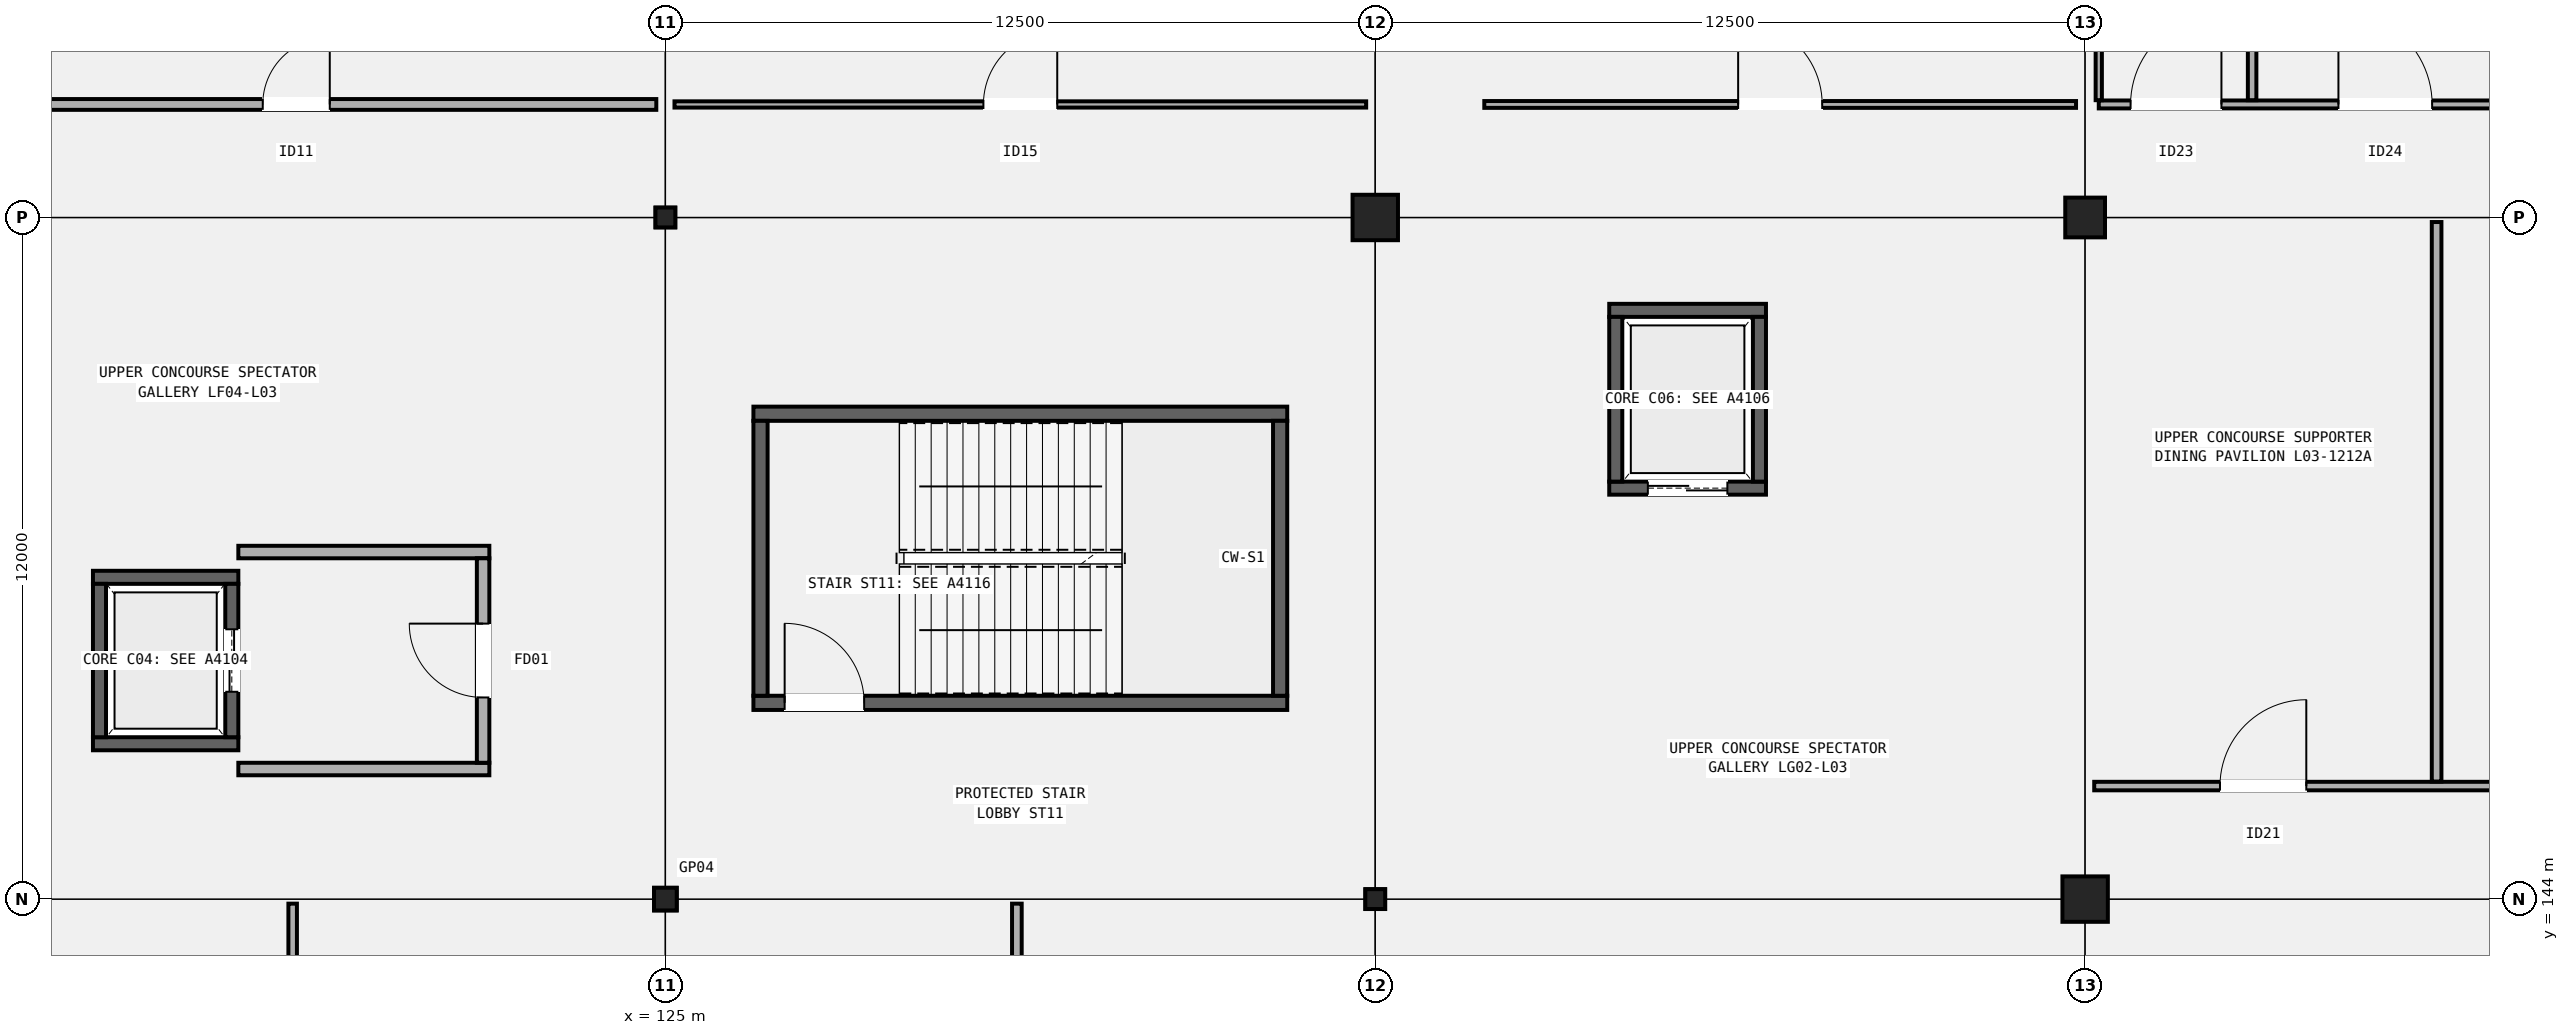
"""IFC4 building model, lengths in metres.
Left out: names, types, materials, properties, quantities, classifications, styles, units other than length and angle.
Written with IfcOpenShell. Run it as: python <this file> out.ifc"""

import sys

from ifc_helpers import new_model, si_unit, direction, frame, frame_2d, origin, origin_2d, place, context, subcontext, project, spatial, rectangle, hollow_rectangle, extrude, element, fill, save


model = new_model("IFC4")
c1 = context("Model", 3, precision=1e-05, world=origin(), true_north=direction((0.0, 1.0)))
c2 = subcontext(c1, "Body", "Model", "MODEL_VIEW")
j1 = project(units=[si_unit("LENGTHUNIT", "METRE"), si_unit("PLANEANGLEUNIT", "RADIAN")], contexts=[c1])
p1 = place(None, origin())
s1 = spatial("IfcSite", under=j1, at=p1, CompositionType="ELEMENT")
p2 = place(p1, origin())
s2 = spatial("IfcBuilding", under=s1, at=p2, CompositionType="ELEMENT")
p3 = place(p2, frame((0.0, 0.0, 15.3)))
s3 = spatial("IfcBuildingStorey", under=s2, at=p3, CompositionType="ELEMENT", Elevation=15.3)
p4 = place(p3, frame((125.0, 144.0, 0.0), z_axis=(0.0, 0.0, 1.0), x_axis=(1.0, 0.0, 0.0)))
e1 = element("IfcColumn", 1, at=p4, inside=s3, PredefinedType="COLUMN", context=c2, shape_type="SweptSolid", body=[
    extrude(hollow_rectangle(XDim=0.4, YDim=0.4, WallThickness=0.016, InnerFilletRadius=0.016, OuterFilletRadius=0.032, at=origin_2d()), origin(), (0.0, 0.0, 1.0), 5.1),
])
for number, where, z_axis, x_axis in (
    (2, (125.0, 156.0, 0.0), (0.0, 0.0, 1.0), (1.0, 0.0, 0.0)),
    (3, (137.5, 144.0, 0.0), (0.0, 0.0, 1.0), (1.0, 0.0, 0.0)),
):
    element("IfcColumn", number, at=place(p3, frame(where, z_axis=z_axis, x_axis=x_axis)), inside=s3, PredefinedType="COLUMN", context=c2, shape_type="SweptSolid", body=[
        extrude(hollow_rectangle(XDim=0.35, YDim=0.35, WallThickness=0.016, InnerFilletRadius=0.016, OuterFilletRadius=0.032, at=origin_2d()), origin(), (0.0, 0.0, 1.0), 5.1),
    ])
for number, where, z_axis, x_axis in (
    (4, (137.5, 156.0, 0.0), (0.0, 0.0, 1.0), (1.0, 0.0, 0.0)),
    (5, (150.0, 144.0, 0.0), (0.0, 0.0, 1.0), (1.0, 0.0, 0.0)),
):
    element("IfcColumn", number, at=place(p3, frame(where, z_axis=z_axis, x_axis=x_axis)), inside=s3, PredefinedType="COLUMN", context=c2, shape_type="SweptSolid", body=[
        extrude(rectangle(XDim=0.8, YDim=0.8, at=origin_2d()), origin(), (0.0, 0.0, 1.0), 5.1),
    ])
p5 = place(p3, frame((150.0, 156.0, 0.0), z_axis=(0.0, 0.0, 1.0), x_axis=(1.0, 0.0, 0.0)))
e6 = element("IfcColumn", 6, at=p5, inside=s3, PredefinedType="COLUMN", context=c2, shape_type="SweptSolid", body=[
    extrude(rectangle(XDim=0.7, YDim=0.7, at=origin_2d()), origin(), (0.0, 0.0, 1.0), 5.1),
])
p6 = place(p3, frame((126.55, 147.455, 0.0), z_axis=(0.0, 0.0, 1.0), x_axis=(1.0, 0.0, 0.0)))
e7 = element("IfcWall", 7, at=p6, inside=s3, PredefinedType="SHEAR", context=c2, shape_type="SweptSolid", body=[
    extrude(rectangle(XDim=9.4, YDim=0.25, at=frame_2d((4.7, 0.0))), origin(), (0.0, 0.0, 1.0), 4.86),
])
p7 = place(p6, frame((0.55, 0.0, 0.0)))
e8 = element("IfcOpeningElement", 8, at=p7, cuts=e7, PredefinedType="OPENING", context=c2, shape_type="SweptSolid", body=[
    extrude(rectangle(XDim=1.4, YDim=2.15, at=frame_2d((0.7, 1.075))), frame((0.0, 0.135, 0.0), z_axis=(0.0, -1.0, 0.0), x_axis=(1.0, 0.0, 0.0)), (0.0, 0.0, 1.0), 0.27),
])
p8 = place(p3, frame((126.55, 152.545, 0.0), z_axis=(0.0, 0.0, 1.0), x_axis=(1.0, 0.0, 0.0)))
e9 = element("IfcWall", 9, at=p8, inside=s3, PredefinedType="SHEAR", context=c2, shape_type="SweptSolid", body=[
    extrude(rectangle(XDim=9.4, YDim=0.25, at=frame_2d((4.7, 0.0))), origin(), (0.0, 0.0, 1.0), 4.86),
])
for number, where, z_axis, x_axis in (
    (10, (126.675, 147.58, 0.0), (0.0, 0.0, 1.0), (0.0, 1.0, 0.0)),
    (11, (135.825, 147.58, 0.0), (0.0, 0.0, 1.0), (0.0, 1.0, 0.0)),
):
    element("IfcWall", number, at=place(p3, frame(where, z_axis=z_axis, x_axis=x_axis)), inside=s3, PredefinedType="SHEAR", context=c2, shape_type="SweptSolid", body=[
        extrude(rectangle(XDim=4.84, YDim=0.25, at=frame_2d((2.42, 0.0))), origin(), (0.0, 0.0, 1.0), 4.86),
    ])
for number, where, z_axis, x_axis in (
    (12, (114.92, 146.735, 0.0), (0.0, 0.0, 1.0), (1.0, 0.0, 0.0)),
    (13, (114.92, 149.665, 0.0), (0.0, 0.0, 1.0), (1.0, 0.0, 0.0)),
):
    element("IfcWall", number, at=place(p3, frame(where, z_axis=z_axis, x_axis=x_axis)), inside=s3, PredefinedType="SHEAR", context=c2, shape_type="SweptSolid", body=[
        extrude(rectangle(XDim=2.56, YDim=0.23, at=frame_2d((1.28, 0.0))), origin(), (0.0, 0.0, 1.0), 4.86),
    ])
p9 = place(p3, frame((115.035, 146.85, 0.0), z_axis=(0.0, 0.0, 1.0), x_axis=(0.0, 1.0, 0.0)))
e14 = element("IfcWall", 14, at=p9, inside=s3, PredefinedType="SHEAR", context=c2, shape_type="SweptSolid", body=[
    extrude(rectangle(XDim=2.7, YDim=0.23, at=frame_2d((1.35, 0.0))), origin(), (0.0, 0.0, 1.0), 4.86),
])
p10 = place(p3, frame((117.365, 146.85, 0.0), z_axis=(0.0, 0.0, 1.0), x_axis=(0.0, 1.0, 0.0)))
e15 = element("IfcWall", 15, at=p10, inside=s3, PredefinedType="SHEAR", context=c2, shape_type="SweptSolid", body=[
    extrude(rectangle(XDim=2.7, YDim=0.23, at=frame_2d((1.35, 0.0))), origin(), (0.0, 0.0, 1.0), 4.86),
])
p11 = place(p10, frame((0.8, 0.0, 0.0)))
e16 = element("IfcOpeningElement", 16, at=p11, cuts=e15, PredefinedType="OPENING", context=c2, shape_type="SweptSolid", body=[
    extrude(rectangle(XDim=1.1, YDim=2.15, at=frame_2d((0.55, 1.075))), frame((0.0, 0.125, 0.0), z_axis=(0.0, -1.0, 0.0), x_axis=(1.0, 0.0, 0.0)), (0.0, 0.0, 1.0), 0.25),
])
for number, where, z_axis, x_axis in (
    (17, (117.48, 146.29, 0.0), (0.0, 0.0, 1.0), (1.0, 0.0, 0.0)),
    (18, (117.48, 150.11, 0.0), (0.0, 0.0, 1.0), (1.0, 0.0, 0.0)),
):
    element("IfcWall", number, at=place(p3, frame(where, z_axis=z_axis, x_axis=x_axis)), inside=s3, PredefinedType="SOLIDWALL", context=c2, shape_type="SweptSolid", body=[
        extrude(rectangle(XDim=4.42, YDim=0.22, at=frame_2d((2.21, 0.0))), origin(), (0.0, 0.0, 1.0), 4.22),
    ])
p12 = place(p3, frame((121.79, 146.4, 0.0), z_axis=(0.0, 0.0, 1.0), x_axis=(0.0, 1.0, 0.0)))
e19 = element("IfcWall", 19, at=p12, inside=s3, PredefinedType="SOLIDWALL", context=c2, shape_type="SweptSolid", body=[
    extrude(rectangle(XDim=3.6, YDim=0.22, at=frame_2d((1.8, 0.0))), origin(), (0.0, 0.0, 1.0), 4.22),
])
p13 = place(p12, frame((1.15, 0.0, 0.0)))
e20 = element("IfcOpeningElement", 20, at=p13, cuts=e19, PredefinedType="OPENING", context=c2, shape_type="SweptSolid", body=[
    extrude(rectangle(XDim=1.3, YDim=2.15, at=frame_2d((0.65, 1.075))), frame((0.0, 0.12, 0.0), z_axis=(0.0, -1.0, 0.0), x_axis=(1.0, 0.0, 0.0)), (0.0, 0.0, 1.0), 0.24),
])
p14 = place(p3, frame((141.62, 151.235, 0.0), z_axis=(0.0, 0.0, 1.0), x_axis=(1.0, 0.0, 0.0)))
e21 = element("IfcWall", 21, at=p14, inside=s3, PredefinedType="SHEAR", context=c2, shape_type="SweptSolid", body=[
    extrude(rectangle(XDim=2.76, YDim=0.23, at=frame_2d((1.38, 0.0))), origin(), (0.0, 0.0, 1.0), 4.86),
])
p15 = place(p14, frame((0.68, 0.0, 0.0)))
e22 = element("IfcOpeningElement", 22, at=p15, cuts=e21, PredefinedType="OPENING", context=c2, shape_type="SweptSolid", body=[
    extrude(rectangle(XDim=1.4, YDim=2.25, at=frame_2d((0.7, 1.125))), frame((0.0, 0.125, 0.0), z_axis=(0.0, -1.0, 0.0), x_axis=(1.0, 0.0, 0.0)), (0.0, 0.0, 1.0), 0.25),
])
p16 = place(p3, frame((141.62, 154.365, 0.0), z_axis=(0.0, 0.0, 1.0), x_axis=(1.0, 0.0, 0.0)))
e23 = element("IfcWall", 23, at=p16, inside=s3, PredefinedType="SHEAR", context=c2, shape_type="SweptSolid", body=[
    extrude(rectangle(XDim=2.76, YDim=0.23, at=frame_2d((1.38, 0.0))), origin(), (0.0, 0.0, 1.0), 4.86),
])
for number, where, z_axis, x_axis in (
    (24, (141.735, 151.35, 0.0), (0.0, 0.0, 1.0), (0.0, 1.0, 0.0)),
    (25, (144.265, 151.35, 0.0), (0.0, 0.0, 1.0), (0.0, 1.0, 0.0)),
):
    element("IfcWall", number, at=place(p3, frame(where, z_axis=z_axis, x_axis=x_axis)), inside=s3, PredefinedType="SHEAR", context=c2, shape_type="SweptSolid", body=[
        extrude(rectangle(XDim=2.9, YDim=0.23, at=frame_2d((1.45, 0.0))), origin(), (0.0, 0.0, 1.0), 4.86),
    ])
p17 = place(p3, frame((118.437, 134.065, 0.0), z_axis=(0.0, 0.0, 1.0), x_axis=(0.0, 1.0, 0.0)))
e26 = element("IfcWall", 26, at=p17, inside=s3, PredefinedType="PARTITIONING", context=c2, shape_type="SweptSolid", body=[
    extrude(rectangle(XDim=9.855, YDim=0.15, at=frame_2d((4.927, 0.0))), origin(), (0.0, 0.0, 1.0), 2.77),
])
p18 = place(p3, frame((112.16, 157.99, 0.0), z_axis=(0.0, 0.0, 1.0), x_axis=(1.0, 0.0, 0.0)))
e27 = element("IfcWall", 27, at=p18, inside=s3, PredefinedType="PARTITIONING", context=c2, shape_type="SweptSolid", body=[
    extrude(rectangle(XDim=12.68, YDim=0.19, at=frame_2d((6.34, 0.0))), origin(), (0.0, 0.0, 1.0), 4.22),
])
p19 = place(p18, frame((5.75, 0.0, 0.0)))
e28 = element("IfcOpeningElement", 28, at=p19, cuts=e27, PredefinedType="OPENING", context=c2, shape_type="SweptSolid", body=[
    extrude(rectangle(XDim=1.18, YDim=2.2, at=frame_2d((0.59, 1.1))), frame((0.0, 0.105, 0.0), z_axis=(0.0, -1.0, 0.0), x_axis=(1.0, 0.0, 0.0)), (0.0, 0.0, 1.0), 0.21),
])
p20 = place(p3, frame((131.189, 134.07, 0.0), z_axis=(0.0, 0.0, 1.0), x_axis=(0.0, 1.0, 0.0)))
e29 = element("IfcWall", 29, at=p20, inside=s3, PredefinedType="PARTITIONING", context=c2, shape_type="SweptSolid", body=[
    extrude(rectangle(XDim=9.85, YDim=0.17, at=frame_2d((4.925, 0.0))), origin(), (0.0, 0.0, 1.0), 2.77),
])
p21 = place(p3, frame((125.16, 157.99, 0.0), z_axis=(0.0, 0.0, 1.0), x_axis=(1.0, 0.0, 0.0)))
e30 = element("IfcWall", 30, at=p21, inside=s3, PredefinedType="PARTITIONING", context=c2, shape_type="SweptSolid", body=[
    extrude(rectangle(XDim=12.18, YDim=0.11, at=frame_2d((6.09, 0.0))), origin(), (0.0, 0.0, 1.0), 4.22),
])
p22 = place(p21, frame((5.44, 0.0, 0.0)))
e31 = element("IfcOpeningElement", 31, at=p22, cuts=e30, PredefinedType="OPENING", context=c2, shape_type="SweptSolid", body=[
    extrude(rectangle(XDim=1.3, YDim=2.24, at=frame_2d((0.65, 1.12))), frame((0.0, 0.065, 0.0), z_axis=(0.0, -1.0, 0.0), x_axis=(1.0, 0.0, 0.0)), (0.0, 0.0, 1.0), 0.13),
])
p23 = place(p3, frame((139.42, 157.99, 0.0), z_axis=(0.0, 0.0, 1.0), x_axis=(1.0, 0.0, 0.0)))
e32 = element("IfcWall", 32, at=p23, inside=s3, PredefinedType="PARTITIONING", context=c2, shape_type="SweptSolid", body=[
    extrude(rectangle(XDim=10.42, YDim=0.12, at=frame_2d((5.21, 0.0))), origin(), (0.0, 0.0, 1.0), 4.22),
])
p24 = place(p23, frame((4.47, 0.0, 0.0)))
e33 = element("IfcOpeningElement", 33, at=p24, cuts=e32, PredefinedType="OPENING", context=c2, shape_type="SweptSolid", body=[
    extrude(rectangle(XDim=1.48, YDim=2.24, at=frame_2d((0.74, 1.12))), frame((0.0, 0.07, 0.0), z_axis=(0.0, -1.0, 0.0), x_axis=(1.0, 0.0, 0.0)), (0.0, 0.0, 1.0), 0.14),
])
p25 = place(p3, frame((150.16, 145.99, 0.0), z_axis=(0.0, 0.0, 1.0), x_axis=(1.0, 0.0, 0.0)))
e34 = element("IfcWall", 34, at=p25, inside=s3, PredefinedType="PARTITIONING", context=c2, shape_type="SweptSolid", body=[
    extrude(rectangle(XDim=12.18, YDim=0.15, at=frame_2d((6.09, 0.0))), origin(), (0.0, 0.0, 1.0), 4.22),
])
p26 = place(p25, frame((2.215, 0.0, 0.0)))
e35 = element("IfcOpeningElement", 35, at=p26, cuts=e34, PredefinedType="OPENING", context=c2, shape_type="SweptSolid", body=[
    extrude(rectangle(XDim=1.52, YDim=2.28, at=frame_2d((0.76, 1.14))), frame((0.0, 0.085, 0.0), z_axis=(0.0, -1.0, 0.0), x_axis=(1.0, 0.0, 0.0)), (0.0, 0.0, 1.0), 0.17),
])
p27 = place(p25, frame((8.365, 0.0, 0.0)))
e36 = element("IfcOpeningElement", 36, at=p27, cuts=e34, PredefinedType="OPENING", context=c2, shape_type="SweptSolid", body=[
    extrude(rectangle(XDim=1.56, YDim=2.26, at=frame_2d((0.78, 1.13))), frame((0.0, 0.085, 0.0), z_axis=(0.0, -1.0, 0.0), x_axis=(1.0, 0.0, 0.0)), (0.0, 0.0, 1.0), 0.17),
])
p28 = place(p3, frame((156.189, 146.07, 0.0), z_axis=(0.0, 0.0, 1.0), x_axis=(0.0, 1.0, 0.0)))
e37 = element("IfcWall", 37, at=p28, inside=s3, PredefinedType="PARTITIONING", context=c2, shape_type="SweptSolid", body=[
    extrude(rectangle(XDim=9.85, YDim=0.17, at=frame_2d((4.925, 0.0))), origin(), (0.0, 0.0, 1.0), 4.22),
])
p29 = place(p3, frame((150.24, 157.99, 0.0), z_axis=(0.0, 0.0, 1.0), x_axis=(1.0, 0.0, 0.0)))
e38 = element("IfcWall", 38, at=p29, inside=s3, PredefinedType="PARTITIONING", context=c2, shape_type="SweptSolid", body=[
    extrude(rectangle(XDim=12.02, YDim=0.14, at=frame_2d((6.01, 0.0))), origin(), (0.0, 0.0, 1.0), 4.22),
])
p30 = place(p29, frame((0.56, 0.0, 0.0)))
e39 = element("IfcOpeningElement", 39, at=p30, cuts=e38, PredefinedType="OPENING", context=c2, shape_type="SweptSolid", body=[
    extrude(rectangle(XDim=1.6, YDim=2.3, at=frame_2d((0.8, 1.15))), frame((0.0, 0.08, 0.0), z_axis=(0.0, -1.0, 0.0), x_axis=(1.0, 0.0, 0.0)), (0.0, 0.0, 1.0), 0.16),
])
p31 = place(p29, frame((4.22, 0.0, 0.0)))
e40 = element("IfcOpeningElement", 40, at=p31, cuts=e38, PredefinedType="OPENING", context=c2, shape_type="SweptSolid", body=[
    extrude(rectangle(XDim=1.65, YDim=2.28, at=frame_2d((0.825, 1.14))), frame((0.0, 0.08, 0.0), z_axis=(0.0, -1.0, 0.0), x_axis=(1.0, 0.0, 0.0)), (0.0, 0.0, 1.0), 0.16),
])
p32 = place(p29, frame((8.845, 0.0, 0.0)))
e41 = element("IfcOpeningElement", 41, at=p32, cuts=e38, PredefinedType="OPENING", context=c2, shape_type="SweptSolid", body=[
    extrude(rectangle(XDim=1.7, YDim=2.32, at=frame_2d((0.85, 1.16))), frame((0.0, 0.08, 0.0), z_axis=(0.0, -1.0, 0.0), x_axis=(1.0, 0.0, 0.0)), (0.0, 0.0, 1.0), 0.16),
])
p33 = place(p3, frame((150.24, 158.065, 0.0), z_axis=(0.0, 0.0, 1.0), x_axis=(0.0, 1.0, 0.0)))
e42 = element("IfcWall", 42, at=p33, inside=s3, PredefinedType="PARTITIONING", context=c2, shape_type="SweptSolid", body=[
    extrude(rectangle(XDim=9.731, YDim=0.11, at=frame_2d((4.865, 0.0))), origin(), (0.0, 0.0, 1.0), 4.22),
])
p34 = place(p3, frame((152.94, 158.065, 0.0), z_axis=(0.0, 0.0, 1.0), x_axis=(0.0, 1.0, 0.0)))
e43 = element("IfcWall", 43, at=p34, inside=s3, PredefinedType="PARTITIONING", context=c2, shape_type="SweptSolid", body=[
    extrude(rectangle(XDim=9.911, YDim=0.15, at=frame_2d((4.956, 0.0))), origin(), (0.0, 0.0, 1.0), 4.22),
])
p35 = place(p7, origin())
e44 = element("IfcDoor", 44, at=p35, inside=s3, OperationType="SINGLE_SWING_LEFT", PredefinedType="DOOR", context=c2, shape_type="SweptSolid", body=[
    extrude(rectangle(XDim=1.4, YDim=2.15, at=frame_2d((0.7, 1.075))), frame((0.0, 0.025, 0.0), z_axis=(0.0, -1.0, 0.0), x_axis=(1.0, 0.0, 0.0)), (0.0, 0.0, 1.0), 0.05),
])
fill(e8, e44)
p36 = place(p11, origin())
e45 = element("IfcDoor", 45, at=p36, inside=s3, OperationType="DOUBLE_DOOR_SLIDING", PredefinedType="DOOR", context=c2, shape_type="SweptSolid", body=[
    extrude(rectangle(XDim=1.1, YDim=2.15, at=frame_2d((0.55, 1.075))), frame((0.0, 0.025, 0.0), z_axis=(0.0, -1.0, 0.0), x_axis=(1.0, 0.0, 0.0)), (0.0, 0.0, 1.0), 0.05),
])
fill(e16, e45)
p37 = place(p13, origin())
e46 = element("IfcDoor", 46, at=p37, inside=s3, OperationType="SINGLE_SWING_RIGHT", PredefinedType="DOOR", context=c2, shape_type="SweptSolid", body=[
    extrude(rectangle(XDim=1.3, YDim=2.15, at=frame_2d((0.65, 1.075))), frame((0.0, 0.025, 0.0), z_axis=(0.0, -1.0, 0.0), x_axis=(1.0, 0.0, 0.0)), (0.0, 0.0, 1.0), 0.05),
])
fill(e20, e46)
p38 = place(p15, origin())
e47 = element("IfcDoor", 47, at=p38, inside=s3, OperationType="DOUBLE_DOOR_SLIDING", PredefinedType="DOOR", context=c2, shape_type="SweptSolid", body=[
    extrude(rectangle(XDim=1.4, YDim=2.25, at=frame_2d((0.7, 1.125))), frame((0.0, 0.025, 0.0), z_axis=(0.0, -1.0, 0.0), x_axis=(1.0, 0.0, 0.0)), (0.0, 0.0, 1.0), 0.05),
])
fill(e22, e47)
p39 = place(p19, origin())
e48 = element("IfcDoor", 48, at=p39, inside=s3, OperationType="SINGLE_SWING_RIGHT", PredefinedType="DOOR", context=c2, shape_type="SweptSolid", body=[
    extrude(rectangle(XDim=1.18, YDim=2.2, at=frame_2d((0.59, 1.1))), frame((0.0, 0.025, 0.0), z_axis=(0.0, -1.0, 0.0), x_axis=(1.0, 0.0, 0.0)), (0.0, 0.0, 1.0), 0.05),
])
fill(e28, e48)
p40 = place(p22, origin())
e49 = element("IfcDoor", 49, at=p40, inside=s3, OperationType="SINGLE_SWING_RIGHT", PredefinedType="DOOR", context=c2, shape_type="SweptSolid", body=[
    extrude(rectangle(XDim=1.3, YDim=2.24, at=frame_2d((0.65, 1.12))), frame((0.0, 0.025, 0.0), z_axis=(0.0, -1.0, 0.0), x_axis=(1.0, 0.0, 0.0)), (0.0, 0.0, 1.0), 0.05),
])
fill(e31, e49)
p41 = place(p24, origin())
e50 = element("IfcDoor", 50, at=p41, inside=s3, OperationType="SINGLE_SWING_LEFT", PredefinedType="DOOR", context=c2, shape_type="SweptSolid", body=[
    extrude(rectangle(XDim=1.48, YDim=2.24, at=frame_2d((0.74, 1.12))), frame((0.0, 0.025, 0.0), z_axis=(0.0, -1.0, 0.0), x_axis=(1.0, 0.0, 0.0)), (0.0, 0.0, 1.0), 0.05),
])
fill(e33, e50)
p42 = place(p26, origin())
e51 = element("IfcDoor", 51, at=p42, inside=s3, OperationType="SINGLE_SWING_RIGHT", PredefinedType="DOOR", context=c2, shape_type="SweptSolid", body=[
    extrude(rectangle(XDim=1.52, YDim=2.28, at=frame_2d((0.76, 1.14))), frame((0.0, 0.025, 0.0), z_axis=(0.0, -1.0, 0.0), x_axis=(1.0, 0.0, 0.0)), (0.0, 0.0, 1.0), 0.05),
])
fill(e35, e51)
p43 = place(p30, origin())
e52 = element("IfcDoor", 52, at=p43, inside=s3, OperationType="SINGLE_SWING_RIGHT", PredefinedType="DOOR", context=c2, shape_type="SweptSolid", body=[
    extrude(rectangle(XDim=1.6, YDim=2.3, at=frame_2d((0.8, 1.15))), frame((0.0, 0.025, 0.0), z_axis=(0.0, -1.0, 0.0), x_axis=(1.0, 0.0, 0.0)), (0.0, 0.0, 1.0), 0.05),
])
fill(e39, e52)
p44 = place(p31, origin())
e53 = element("IfcDoor", 53, at=p44, inside=s3, OperationType="SINGLE_SWING_LEFT", PredefinedType="DOOR", context=c2, shape_type="SweptSolid", body=[
    extrude(rectangle(XDim=1.65, YDim=2.28, at=frame_2d((0.825, 1.14))), frame((0.0, 0.025, 0.0), z_axis=(0.0, -1.0, 0.0), x_axis=(1.0, 0.0, 0.0)), (0.0, 0.0, 1.0), 0.05),
])
fill(e40, e53)
save(model, sys.argv[1])
